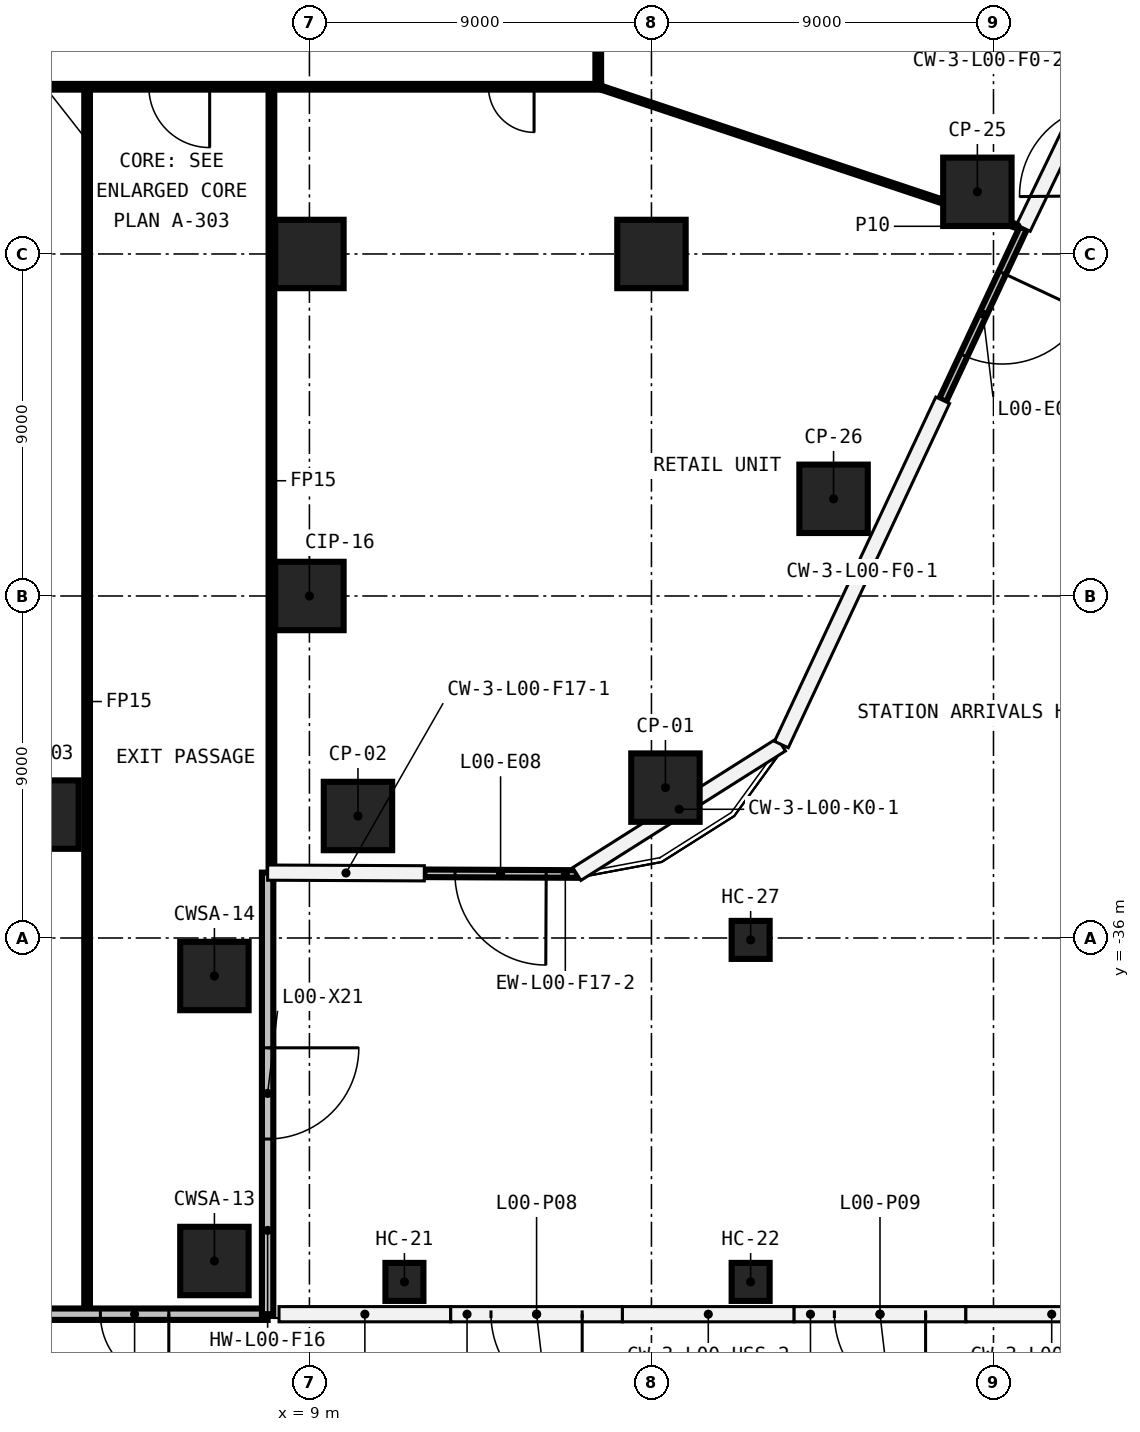
"""IFC4 building model, lengths in metres.
Left out: names, types, materials, properties, quantities, classifications, styles, units other than length and angle.
Written with IfcOpenShell. Run it as: python <this file> out.ifc"""

import sys

from ifc_helpers import new_model, si_unit, direction, frame, frame_2d, origin, origin_2d, place, context, subcontext, project, spatial, rectangle, extrude, element, fill, save


model = new_model("IFC4")
c1 = context("Model", 3, precision=1e-05, world=origin(), true_north=direction((0.0, 1.0)))
c2 = subcontext(c1, "Body", "Model", "MODEL_VIEW")
j1 = project(units=[si_unit("LENGTHUNIT", "METRE"), si_unit("PLANEANGLEUNIT", "RADIAN")], contexts=[c1])
p1 = place(None, origin())
s1 = spatial("IfcSite", under=j1, at=p1, CompositionType="ELEMENT")
p2 = place(p1, origin())
s2 = spatial("IfcBuilding", under=s1, at=p2, CompositionType="ELEMENT")
p3 = place(p2, origin())
s3 = spatial("IfcBuildingStorey", under=s2, at=p3, CompositionType="ELEMENT", Elevation=0.0)
for number, where, z_axis, x_axis in (
    (1, (18.368, -32.043, 0.0), (0.0, 0.0, 1.0), (1.0, 0.0, 0.0)),
    (2, (10.277, -32.79, 0.0), (0.0, 0.0, 1.0), (1.0, 0.0, 0.0)),
    (3, (2.027, -32.753, 0.0), (0.0, 0.0, 1.0), (1.0, 0.0, 0.0)),
    (4, (26.576, -16.364, 0.0), (0.0, 0.0, 1.0), (1.0, 0.0, 0.0)),
    (5, (22.792, -24.443, 0.0), (0.0, 0.0, 1.0), (1.0, 0.0, 0.0)),
    (6, (9.0, -27.0, 0.0), (0.0, 0.0, 1.0), (1.0, 0.0, 0.0)),
    (7, (9.0, -18.0, 0.0), (0.0, 0.0, 1.0), (1.0, 0.0, 0.0)),
    (8, (18.0, -18.0, 0.0), (0.0, 0.0, 1.0), (1.0, 0.0, 0.0)),
    (9, (6.5, -44.5, 0.0), (0.0, 0.0, 1.0), (1.0, 0.0, 0.0)),
    (10, (6.5, -37.0, 0.0), (0.0, 0.0, 1.0), (1.0, 0.0, 0.0)),
):
    element("IfcColumn", number, at=place(p3, frame(where, z_axis=z_axis, x_axis=x_axis)), inside=s3, PredefinedType="COLUMN", context=c2, shape_type="SweptSolid", body=[
        extrude(rectangle(XDim=1.8, YDim=1.8, at=origin_2d()), origin(), (0.0, 0.0, 1.0), 8.55),
    ])
p4 = place(p3, frame((16.675, -13.6, 0.0), z_axis=(0.0, 0.0, 1.0), x_axis=(-1.0, 0.0, 0.0)))
e11 = element("IfcWall", 11, at=p4, inside=s3, PredefinedType="PARTITIONING", context=c2, shape_type="SweptSolid", body=[
    extrude(rectangle(XDim=33.35, YDim=0.15, at=frame_2d((16.675, 0.0))), origin(), (0.0, 0.0, 1.0), 8.55),
])
p5 = place(p4, frame((27.636, 0.0, 0.0)))
e12 = element("IfcOpeningElement", 12, at=p5, cuts=e11, PredefinedType="OPENING", context=c2, shape_type="SweptSolid", body=[
    extrude(rectangle(XDim=1.8, YDim=2.4, at=frame_2d((0.9, 1.2))), frame((0.0, 0.085, 0.0), z_axis=(0.0, -1.0, 0.0), x_axis=(1.0, 0.0, 0.0)), (0.0, 0.0, 1.0), 0.17),
])
p6 = place(p4, frame((23.492, 0.0, 0.0)))
e13 = element("IfcOpeningElement", 13, at=p6, cuts=e11, PredefinedType="OPENING", context=c2, shape_type="SweptSolid", body=[
    extrude(rectangle(XDim=1.2, YDim=2.1, at=frame_2d((0.6, 1.05))), frame((0.0, 0.085, 0.0), z_axis=(0.0, -1.0, 0.0), x_axis=(1.0, 0.0, 0.0)), (0.0, 0.0, 1.0), 0.17),
])
p7 = place(p4, frame((17.167, 0.0, 0.0)))
e14 = element("IfcOpeningElement", 14, at=p7, cuts=e11, PredefinedType="OPENING", context=c2, shape_type="SweptSolid", body=[
    extrude(rectangle(XDim=1.2, YDim=2.1, at=frame_2d((0.6, 1.05))), frame((0.0, 0.085, 0.0), z_axis=(0.0, -1.0, 0.0), x_axis=(1.0, 0.0, 0.0)), (0.0, 0.0, 1.0), 0.17),
])
p8 = place(p4, frame((1.764, 0.0, 0.0)))
e15 = element("IfcOpeningElement", 15, at=p8, cuts=e11, PredefinedType="OPENING", context=c2, shape_type="SweptSolid", body=[
    extrude(rectangle(XDim=1.2, YDim=2.1, at=frame_2d((0.6, 1.05))), frame((0.0, 0.085, 0.0), z_axis=(0.0, -1.0, 0.0), x_axis=(1.0, 0.0, 0.0)), (0.0, 0.0, 1.0), 0.17),
])
p9 = place(p4, frame((10.3, 0.0, 0.0)))
e16 = element("IfcOpeningElement", 16, at=p9, cuts=e11, PredefinedType="OPENING", context=c2, shape_type="SweptSolid", body=[
    extrude(rectangle(XDim=1.6, YDim=2.1, at=frame_2d((0.8, 1.05))), frame((0.0, 0.085, 0.0), z_axis=(0.0, -1.0, 0.0), x_axis=(1.0, 0.0, 0.0)), (0.0, 0.0, 1.0), 0.17),
])
p10 = place(p3, frame((16.6, 13.525, 0.0), z_axis=(0.0, 0.0, 1.0), x_axis=(0.0, -1.0, 0.0)))
e17 = element("IfcWall", 17, at=p10, inside=s3, PredefinedType="PARTITIONING", context=c2, shape_type="SweptSolid", body=[
    extrude(rectangle(XDim=27.05, YDim=0.15, at=frame_2d((13.525, 0.0))), origin(), (0.0, 0.0, 1.0), 8.55),
])
p11 = place(p10, frame((17.482, 0.0, 0.0)))
e18 = element("IfcOpeningElement", 18, at=p11, cuts=e17, PredefinedType="OPENING", context=c2, shape_type="SweptSolid", body=[
    extrude(rectangle(XDim=1.2, YDim=2.1, at=frame_2d((0.6, 1.05))), frame((0.0, 0.085, 0.0), z_axis=(0.0, -1.0, 0.0), x_axis=(1.0, 0.0, 0.0)), (0.0, 0.0, 1.0), 0.17),
])
p12 = place(p3, frame((8.0, -34.26, 0.0), z_axis=(0.0, 0.0, 1.0), x_axis=(0.0, 1.0, 0.0)))
e19 = element("IfcWall", 19, at=p12, inside=s3, PredefinedType="PARTITIONING", context=c2, shape_type="SweptSolid", body=[
    extrude(rectangle(XDim=20.585, YDim=0.15, at=frame_2d((10.292, 0.0))), origin(), (0.0, 0.0, 1.0), 8.55),
])
p13 = place(p3, frame((3.15, -45.88, 0.0), z_axis=(0.0, 0.0, 1.0), x_axis=(0.0, 1.0, 0.0)))
e20 = element("IfcWall", 20, at=p13, inside=s3, PredefinedType="PARTITIONING", context=c2, shape_type="SweptSolid", body=[
    extrude(rectangle(XDim=32.205, YDim=0.15, at=frame_2d((16.103, 0.0))), origin(), (0.0, 0.0, 1.0), 8.55),
])
p14 = place(p3, frame((16.6, -13.6, 0.0), z_axis=(0.0, 0.0, 1.0), x_axis=(0.948711366471, -0.316143548294, 0.0)))
e21 = element("IfcWall", 21, at=p14, inside=s3, PredefinedType="PARTITIONING", context=c2, shape_type="SweptSolid", body=[
    extrude(rectangle(XDim=9.567, YDim=0.1, at=frame_2d((4.783, 0.0))), origin(), (0.0, 0.0, 1.0), 8.55),
])
p15 = place(p3, frame((27.476, -17.224, 0.0), z_axis=(0.0, 0.0, 1.0), x_axis=(0.948845092647, -0.31574196769, 0.0)))
e22 = element("IfcWall", 22, at=p15, inside=s3, PredefinedType="PARTITIONING", context=c2, shape_type="SweptSolid", body=[
    extrude(rectangle(XDim=0.302, YDim=0.1, at=frame_2d((0.151, 0.0))), origin(), (0.0, 0.0, 1.0), 8.55),
])
p16 = place(p3, frame((27.786, -17.316, 0.0), z_axis=(0.0, 0.0, 1.0), x_axis=(-0.424089032009, -0.905620501606, 0.0)))
e23 = element("IfcWall", 23, at=p16, inside=s3, PredefinedType="SOLIDWALL", context=c2, shape_type="SweptSolid", body=[
    extrude(rectangle(XDim=5.007, YDim=0.2, at=frame_2d((2.503, 0.0))), origin(), (0.0, 0.0, 1.0), 8.55),
])
p17 = place(p16, frame((1.303, 0.0, 0.0)))
e24 = element("IfcOpeningElement", 24, at=p17, cuts=e23, PredefinedType="OPENING", context=c2, shape_type="SweptSolid", body=[
    extrude(rectangle(XDim=2.4, YDim=2.4, at=frame_2d((1.2, 1.2))), frame((0.0, 0.11, 0.0), z_axis=(0.0, -1.0, 0.0), x_axis=(1.0, 0.0, 0.0)), (0.0, 0.0, 1.0), 0.22),
])
p18 = place(p3, frame((7.9, -45.9, 0.0), z_axis=(0.0, 0.0, 1.0), x_axis=(-1.0, 0.0, 0.0)))
e25 = element("IfcWall", 25, at=p18, inside=s3, PredefinedType="SOLIDWALL", context=c2, shape_type="SweptSolid", body=[
    extrude(rectangle(XDim=39.8, YDim=0.3, at=frame_2d((19.9, 0.0))), origin(), (0.0, 0.0, 1.0), 8.55),
])
p19 = place(p18, frame((32.067, 0.0, 0.0)))
e26 = element("IfcOpeningElement", 26, at=p19, cuts=e25, PredefinedType="OPENING", context=c2, shape_type="SweptSolid", body=[
    extrude(rectangle(XDim=2.4, YDim=2.4, at=frame_2d((1.2, 1.2))), frame((0.0, 0.16, 0.0), z_axis=(0.0, -1.0, 0.0), x_axis=(1.0, 0.0, 0.0)), (0.0, 0.0, 1.0), 0.32),
])
p20 = place(p18, frame((18.7, 0.0, 0.0)))
e27 = element("IfcOpeningElement", 27, at=p20, cuts=e25, PredefinedType="OPENING", context=c2, shape_type="SweptSolid", body=[
    extrude(rectangle(XDim=2.4, YDim=2.4, at=frame_2d((1.2, 1.2))), frame((0.0, 0.16, 0.0), z_axis=(0.0, -1.0, 0.0), x_axis=(1.0, 0.0, 0.0)), (0.0, 0.0, 1.0), 0.32),
])
p21 = place(p18, frame((2.6, 0.0, 0.0)))
e28 = element("IfcOpeningElement", 28, at=p21, cuts=e25, PredefinedType="OPENING", context=c2, shape_type="SweptSolid", body=[
    extrude(rectangle(XDim=1.8, YDim=2.4, at=frame_2d((0.9, 1.2))), frame((0.0, 0.16, 0.0), z_axis=(0.0, -1.0, 0.0), x_axis=(1.0, 0.0, 0.0)), (0.0, 0.0, 1.0), 0.32),
])
p22 = place(p3, frame((7.9, -34.28, 0.0), z_axis=(0.0, 0.0, 1.0), x_axis=(0.0, -1.0, 0.0)))
e29 = element("IfcWall", 29, at=p22, inside=s3, PredefinedType="SOLIDWALL", context=c2, shape_type="SweptSolid", body=[
    extrude(rectangle(XDim=11.62, YDim=0.3, at=frame_2d((5.81, 0.0))), origin(), (0.0, 0.0, 1.0), 8.55),
])
p23 = place(p22, frame((4.61, 0.0, 0.0)))
e30 = element("IfcOpeningElement", 30, at=p23, cuts=e29, PredefinedType="OPENING", context=c2, shape_type="SweptSolid", body=[
    extrude(rectangle(XDim=2.4, YDim=2.4, at=frame_2d((1.2, 1.2))), frame((0.0, 0.16, 0.0), z_axis=(0.0, -1.0, 0.0), x_axis=(1.0, 0.0, 0.0)), (0.0, 0.0, 1.0), 0.32),
])
p24 = place(p3, frame((16.037, -34.316, 0.0), z_axis=(0.0, 0.0, 1.0), x_axis=(-0.999990139218, 0.004440885762, 0.0)))
e31 = element("IfcWall", 31, at=p24, inside=s3, PredefinedType="SOLIDWALL", context=c2, shape_type="SweptSolid", body=[
    extrude(rectangle(XDim=4.013, YDim=0.2, at=frame_2d((2.007, 0.0))), origin(), (0.0, 0.0, 1.0), 8.55),
])
p25 = place(p24, frame((0.807, 0.0, 0.0)))
e32 = element("IfcOpeningElement", 32, at=p25, cuts=e31, PredefinedType="OPENING", context=c2, shape_type="SweptSolid", body=[
    extrude(rectangle(XDim=2.4, YDim=2.4, at=frame_2d((1.2, 1.2))), frame((0.0, 0.11, 0.0), z_axis=(0.0, -1.0, 0.0), x_axis=(1.0, 0.0, 0.0)), (0.0, 0.0, 1.0), 0.22),
])
for number, where, z_axis, x_axis in (
    (33, (11.5, -45.05, -0.3), (0.0, 0.0, 1.0), (1.0, 0.0, 0.0)),
    (34, (20.61, -45.05, -0.3), (0.0, 0.0, 1.0), (1.0, 0.0, 0.0)),
    (35, (20.61, -36.05, -0.3), (0.0, 0.0, 1.0), (1.0, 0.0, 0.0)),
):
    element("IfcColumn", number, at=place(p3, frame(where, z_axis=z_axis, x_axis=x_axis)), inside=s3, PredefinedType="COLUMN", context=c2, shape_type="SweptSolid", body=[
        extrude(rectangle(XDim=1.0, YDim=1.0, at=origin_2d()), origin(), (0.0, 0.0, 1.0), 18.85),
    ])
p26 = place(p3, frame((17.236, -45.9, 0.0), z_axis=(0.0, 0.0, 1.0), x_axis=(-1.0, 0.0, 0.0)))
e36 = element("IfcWall", 36, at=p26, inside=s3, PredefinedType="SOLIDWALL", context=c2, shape_type="SweptSolid", body=[
    extrude(rectangle(XDim=4.518, YDim=0.2, at=frame_2d((2.259, 0.0))), origin(), (0.0, 0.0, 1.0), 4.8),
])
p27 = place(p26, frame((1.059, 0.0, 0.0)))
e37 = element("IfcOpeningElement", 37, at=p27, cuts=e36, PredefinedType="OPENING", context=c2, shape_type="SweptSolid", body=[
    extrude(rectangle(XDim=2.4, YDim=2.4, at=frame_2d((1.2, 1.2))), frame((0.0, 0.11, 0.0), z_axis=(0.0, -1.0, 0.0), x_axis=(1.0, 0.0, 0.0)), (0.0, 0.0, 1.0), 0.22),
])
p28 = place(p3, frame((26.273, -45.9, 0.0), z_axis=(0.0, 0.0, 1.0), x_axis=(-1.0, 0.0, 0.0)))
e38 = element("IfcWall", 38, at=p28, inside=s3, PredefinedType="SOLIDWALL", context=c2, shape_type="SweptSolid", body=[
    extrude(rectangle(XDim=4.518, YDim=0.2, at=frame_2d((2.259, 0.0))), origin(), (0.0, 0.0, 1.0), 4.8),
])
p29 = place(p28, frame((1.059, 0.0, 0.0)))
e39 = element("IfcOpeningElement", 39, at=p29, cuts=e38, PredefinedType="OPENING", context=c2, shape_type="SweptSolid", body=[
    extrude(rectangle(XDim=2.4, YDim=2.4, at=frame_2d((1.2, 1.2))), frame((0.0, 0.11, 0.0), z_axis=(0.0, -1.0, 0.0), x_axis=(1.0, 0.0, 0.0)), (0.0, 0.0, 1.0), 0.22),
])
p30 = place(p8, origin())
e40 = element("IfcDoor", 40, at=p30, inside=s3, OperationType="SINGLE_SWING_RIGHT", PredefinedType="DOOR", context=c2, shape_type="SweptSolid", body=[
    extrude(rectangle(XDim=1.2, YDim=2.1, at=frame_2d((0.6, 1.05))), frame((0.0, 0.025, 0.0), z_axis=(0.0, -1.0, 0.0), x_axis=(1.0, 0.0, 0.0)), (0.0, 0.0, 1.0), 0.05),
])
fill(e15, e40)
p31 = place(p9, origin())
e41 = element("IfcDoor", 41, at=p31, inside=s3, OperationType="DOUBLE_DOOR_SINGLE_SWING", PredefinedType="DOOR", context=c2, shape_type="SweptSolid", body=[
    extrude(rectangle(XDim=1.6, YDim=2.1, at=frame_2d((0.8, 1.05))), frame((0.0, 0.025, 0.0), z_axis=(0.0, -1.0, 0.0), x_axis=(1.0, 0.0, 0.0)), (0.0, 0.0, 1.0), 0.05),
])
fill(e16, e41)
p32 = place(p17, origin())
e42 = element("IfcDoor", 42, at=p32, inside=s3, OperationType="SINGLE_SWING_LEFT", PredefinedType="DOOR", context=c2, shape_type="SweptSolid", body=[
    extrude(rectangle(XDim=2.4, YDim=2.4, at=frame_2d((1.2, 1.2))), frame((0.0, 0.025, 0.0), z_axis=(0.0, -1.0, 0.0), x_axis=(1.0, 0.0, 0.0)), (0.0, 0.0, 1.0), 0.05),
])
fill(e24, e42)
p33 = place(p21, origin())
e43 = element("IfcDoor", 43, at=p33, inside=s3, OperationType="SINGLE_SWING_LEFT", PredefinedType="DOOR", context=c2, shape_type="SweptSolid", body=[
    extrude(rectangle(XDim=1.8, YDim=2.4, at=frame_2d((0.9, 1.2))), frame((0.0, 0.025, 0.0), z_axis=(0.0, -1.0, 0.0), x_axis=(1.0, 0.0, 0.0)), (0.0, 0.0, 1.0), 0.05),
])
fill(e28, e43)
p34 = place(p23, origin())
e44 = element("IfcDoor", 44, at=p34, inside=s3, OperationType="SINGLE_SWING_LEFT", PredefinedType="DOOR", context=c2, shape_type="SweptSolid", body=[
    extrude(rectangle(XDim=2.4, YDim=2.4, at=frame_2d((1.2, 1.2))), frame((0.0, 0.025, 0.0), z_axis=(0.0, -1.0, 0.0), x_axis=(1.0, 0.0, 0.0)), (0.0, 0.0, 1.0), 0.05),
])
fill(e30, e44)
p35 = place(p25, origin())
e45 = element("IfcDoor", 45, at=p35, inside=s3, OperationType="SINGLE_SWING_LEFT", PredefinedType="DOOR", context=c2, shape_type="SweptSolid", body=[
    extrude(rectangle(XDim=2.4, YDim=2.4, at=frame_2d((1.2, 1.2))), frame((0.0, 0.025, 0.0), z_axis=(0.0, -1.0, 0.0), x_axis=(1.0, 0.0, 0.0)), (0.0, 0.0, 1.0), 0.05),
])
fill(e32, e45)
p36 = place(p27, origin())
e46 = element("IfcDoor", 46, at=p36, inside=s3, OperationType="SINGLE_SWING_LEFT", PredefinedType="DOOR", context=c2, shape_type="SweptSolid", body=[
    extrude(rectangle(XDim=2.4, YDim=2.4, at=frame_2d((1.2, 1.2))), frame((0.0, 0.025, 0.0), z_axis=(0.0, -1.0, 0.0), x_axis=(1.0, 0.0, 0.0)), (0.0, 0.0, 1.0), 0.05),
])
fill(e37, e46)
p37 = place(p29, origin())
e47 = element("IfcDoor", 47, at=p37, inside=s3, OperationType="SINGLE_SWING_LEFT", PredefinedType="DOOR", context=c2, shape_type="SweptSolid", body=[
    extrude(rectangle(XDim=2.4, YDim=2.4, at=frame_2d((1.2, 1.2))), frame((0.0, 0.025, 0.0), z_axis=(0.0, -1.0, 0.0), x_axis=(1.0, 0.0, 0.0)), (0.0, 0.0, 1.0), 0.05),
])
fill(e39, e47)
save(model, sys.argv[1])
